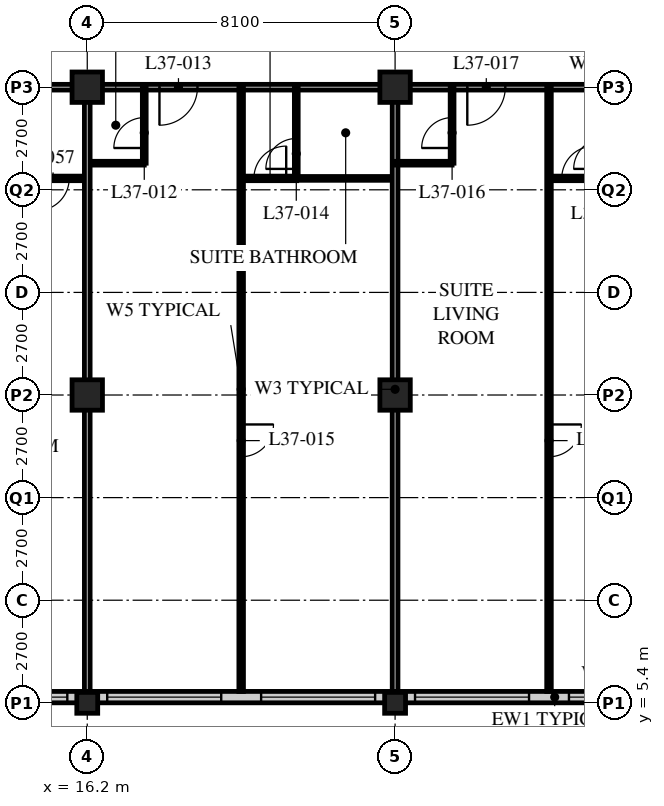
"""IFC4 building model, lengths in metres.
Left out: names, types, materials, properties, quantities, classifications, styles, units other than length and angle.
Written with IfcOpenShell. Run it as: python <this file> out.ifc"""

import sys

from ifc_helpers import new_model, si_unit, direction, frame, frame_2d, origin, origin_2d, place, context, subcontext, project, spatial, rectangle, hollow_rectangle, extrude, element, fill, save


model = new_model("IFC4")
c1 = context("Model", 3, precision=1e-05, world=origin(), true_north=direction((0.0, 1.0)))
c2 = subcontext(c1, "Body", "Model", "MODEL_VIEW")
j1 = project(units=[si_unit("LENGTHUNIT", "METRE"), si_unit("PLANEANGLEUNIT", "RADIAN")], contexts=[c1])
p1 = place(None, origin())
s1 = spatial("IfcSite", under=j1, at=p1, CompositionType="ELEMENT")
p2 = place(p1, origin())
s2 = spatial("IfcBuilding", under=s1, at=p2, CompositionType="ELEMENT")
p3 = place(p2, frame((0.0, 0.0, 144.2)))
s3 = spatial("IfcBuildingStorey", under=s2, at=p3, CompositionType="ELEMENT", Elevation=144.2)
p4 = place(p3, frame((16.2, 5.4, 0.0), z_axis=(0.0, 0.0, 1.0), x_axis=(1.0, 0.0, 0.0)))
e1 = element("IfcColumn", 1, at=p4, inside=s3, PredefinedType="COLUMN", context=c2, shape_type="SweptSolid", body=[
    extrude(hollow_rectangle(XDim=0.55, YDim=0.55, WallThickness=0.04, at=origin_2d()), origin(), (0.0, 0.0, 1.0), 3.4),
])
for number, where, z_axis, x_axis in (
    (2, (16.2, 13.5, 0.0), (0.0, 0.0, 1.0), (1.0, 0.0, 0.0)),
    (3, (16.2, 21.6, 0.0), (0.0, 0.0, 1.0), (1.0, 0.0, 0.0)),
):
    element("IfcColumn", number, at=place(p3, frame(where, z_axis=z_axis, x_axis=x_axis)), inside=s3, PredefinedType="COLUMN", context=c2, shape_type="SweptSolid", body=[
        extrude(hollow_rectangle(XDim=0.8, YDim=0.8, WallThickness=0.08, at=origin_2d()), origin(), (0.0, 0.0, 1.0), 3.4),
    ])
p5 = place(p3, frame((24.3, 5.4, 0.0), z_axis=(0.0, 0.0, 1.0), x_axis=(1.0, 0.0, 0.0)))
e4 = element("IfcColumn", 4, at=p5, inside=s3, PredefinedType="COLUMN", context=c2, shape_type="SweptSolid", body=[
    extrude(hollow_rectangle(XDim=0.55, YDim=0.55, WallThickness=0.04, at=origin_2d()), origin(), (0.0, 0.0, 1.0), 3.4),
])
for number, where, z_axis, x_axis in (
    (5, (24.3, 13.5, 0.0), (0.0, 0.0, 1.0), (1.0, 0.0, 0.0)),
    (6, (24.3, 21.6, 0.0), (0.0, 0.0, 1.0), (1.0, 0.0, 0.0)),
):
    element("IfcColumn", number, at=place(p3, frame(where, z_axis=z_axis, x_axis=x_axis)), inside=s3, PredefinedType="COLUMN", context=c2, shape_type="SweptSolid", body=[
        extrude(hollow_rectangle(XDim=0.8, YDim=0.8, WallThickness=0.08, at=origin_2d()), origin(), (0.0, 0.0, 1.0), 3.4),
    ])
p6 = place(p3, frame((8.4, 5.55, 0.0), z_axis=(0.0, 0.0, 1.0), x_axis=(1.0, 0.0, 0.0)))
e7 = element("IfcWall", 7, at=p6, inside=s3, PredefinedType="SOLIDWALL", context=c2, shape_type="SweptSolid", body=[
    extrude(rectangle(XDim=40.2, YDim=0.3, at=frame_2d((20.1, 0.0))), origin(), (0.0, 0.0, 1.0), 3.19),
])
p7 = place(p6, frame((0.225, 0.0, 0.9)))
e8 = element("IfcOpeningElement", 8, at=p7, cuts=e7, PredefinedType="OPENING", context=c2, shape_type="SweptSolid", body=[
    extrude(rectangle(XDim=3.0, YDim=1.4, at=frame_2d((1.5, 0.7))), frame((0.0, 0.16, 0.0), z_axis=(0.0, -1.0, 0.0), x_axis=(1.0, 0.0, 0.0)), (0.0, 0.0, 1.0), 0.32),
])
p8 = place(p6, frame((4.275, 0.0, 0.9)))
e9 = element("IfcOpeningElement", 9, at=p8, cuts=e7, PredefinedType="OPENING", context=c2, shape_type="SweptSolid", body=[
    extrude(rectangle(XDim=3.0, YDim=1.4, at=frame_2d((1.5, 0.7))), frame((0.0, 0.16, 0.0), z_axis=(0.0, -1.0, 0.0), x_axis=(1.0, 0.0, 0.0)), (0.0, 0.0, 1.0), 0.32),
])
p9 = place(p6, frame((8.325, 0.0, 0.9)))
e10 = element("IfcOpeningElement", 10, at=p9, cuts=e7, PredefinedType="OPENING", context=c2, shape_type="SweptSolid", body=[
    extrude(rectangle(XDim=3.0, YDim=1.4, at=frame_2d((1.5, 0.7))), frame((0.0, 0.16, 0.0), z_axis=(0.0, -1.0, 0.0), x_axis=(1.0, 0.0, 0.0)), (0.0, 0.0, 1.0), 0.32),
])
p10 = place(p6, frame((12.375, 0.0, 0.9)))
e11 = element("IfcOpeningElement", 11, at=p10, cuts=e7, PredefinedType="OPENING", context=c2, shape_type="SweptSolid", body=[
    extrude(rectangle(XDim=3.0, YDim=1.4, at=frame_2d((1.5, 0.7))), frame((0.0, 0.16, 0.0), z_axis=(0.0, -1.0, 0.0), x_axis=(1.0, 0.0, 0.0)), (0.0, 0.0, 1.0), 0.32),
])
p11 = place(p6, frame((16.425, 0.0, 0.9)))
e12 = element("IfcOpeningElement", 12, at=p11, cuts=e7, PredefinedType="OPENING", context=c2, shape_type="SweptSolid", body=[
    extrude(rectangle(XDim=3.0, YDim=1.4, at=frame_2d((1.5, 0.7))), frame((0.0, 0.16, 0.0), z_axis=(0.0, -1.0, 0.0), x_axis=(1.0, 0.0, 0.0)), (0.0, 0.0, 1.0), 0.32),
])
p12 = place(p6, frame((20.475, 0.0, 0.9)))
e13 = element("IfcOpeningElement", 13, at=p12, cuts=e7, PredefinedType="OPENING", context=c2, shape_type="SweptSolid", body=[
    extrude(rectangle(XDim=3.0, YDim=1.4, at=frame_2d((1.5, 0.7))), frame((0.0, 0.16, 0.0), z_axis=(0.0, -1.0, 0.0), x_axis=(1.0, 0.0, 0.0)), (0.0, 0.0, 1.0), 0.32),
])
p13 = place(p6, frame((24.525, 0.0, 0.9)))
e14 = element("IfcOpeningElement", 14, at=p13, cuts=e7, PredefinedType="OPENING", context=c2, shape_type="SweptSolid", body=[
    extrude(rectangle(XDim=3.0, YDim=1.4, at=frame_2d((1.5, 0.7))), frame((0.0, 0.16, 0.0), z_axis=(0.0, -1.0, 0.0), x_axis=(1.0, 0.0, 0.0)), (0.0, 0.0, 1.0), 0.32),
])
p14 = place(p6, frame((28.575, 0.0, 0.9)))
e15 = element("IfcOpeningElement", 15, at=p14, cuts=e7, PredefinedType="OPENING", context=c2, shape_type="SweptSolid", body=[
    extrude(rectangle(XDim=3.0, YDim=1.4, at=frame_2d((1.5, 0.7))), frame((0.0, 0.16, 0.0), z_axis=(0.0, -1.0, 0.0), x_axis=(1.0, 0.0, 0.0)), (0.0, 0.0, 1.0), 0.32),
])
p15 = place(p6, frame((32.625, 0.0, 0.9)))
e16 = element("IfcOpeningElement", 16, at=p15, cuts=e7, PredefinedType="OPENING", context=c2, shape_type="SweptSolid", body=[
    extrude(rectangle(XDim=3.0, YDim=1.4, at=frame_2d((1.5, 0.7))), frame((0.0, 0.16, 0.0), z_axis=(0.0, -1.0, 0.0), x_axis=(1.0, 0.0, 0.0)), (0.0, 0.0, 1.0), 0.32),
])
p16 = place(p6, frame((36.675, 0.0, 0.9)))
e17 = element("IfcOpeningElement", 17, at=p16, cuts=e7, PredefinedType="OPENING", context=c2, shape_type="SweptSolid", body=[
    extrude(rectangle(XDim=3.0, YDim=1.4, at=frame_2d((1.5, 0.7))), frame((0.0, 0.16, 0.0), z_axis=(0.0, -1.0, 0.0), x_axis=(1.0, 0.0, 0.0)), (0.0, 0.0, 1.0), 0.32),
])
p17 = place(p3, frame((12.15, 21.6, 0.0), z_axis=(0.0, 0.0, 1.0), x_axis=(1.0, 0.0, 0.0)))
e18 = element("IfcWall", 18, at=p17, inside=s3, PredefinedType="PARTITIONING", context=c2, shape_type="SweptSolid", body=[
    extrude(rectangle(XDim=36.45, YDim=0.15, at=frame_2d((18.225, 0.0))), origin(), (0.0, 0.0, 1.0), 2.42),
])
p18 = place(p17, frame((5.95, 0.0, 0.0)))
e19 = element("IfcOpeningElement", 19, at=p18, cuts=e18, PredefinedType="OPENING", context=c2, shape_type="SweptSolid", body=[
    extrude(rectangle(XDim=1.0, YDim=2.1, at=frame_2d((0.5, 1.05))), frame((0.0, 0.085, 0.0), z_axis=(0.0, -1.0, 0.0), x_axis=(1.0, 0.0, 0.0)), (0.0, 0.0, 1.0), 0.17),
])
p19 = place(p17, frame((14.05, 0.0, 0.0)))
e20 = element("IfcOpeningElement", 20, at=p19, cuts=e18, PredefinedType="OPENING", context=c2, shape_type="SweptSolid", body=[
    extrude(rectangle(XDim=1.0, YDim=2.1, at=frame_2d((0.5, 1.05))), frame((0.0, 0.085, 0.0), z_axis=(0.0, -1.0, 0.0), x_axis=(1.0, 0.0, 0.0)), (0.0, 0.0, 1.0), 0.17),
])
p20 = place(p17, frame((22.15, 0.0, 0.0)))
e21 = element("IfcOpeningElement", 21, at=p20, cuts=e18, PredefinedType="OPENING", context=c2, shape_type="SweptSolid", body=[
    extrude(rectangle(XDim=1.0, YDim=2.1, at=frame_2d((0.5, 1.05))), frame((0.0, 0.085, 0.0), z_axis=(0.0, -1.0, 0.0), x_axis=(1.0, 0.0, 0.0)), (0.0, 0.0, 1.0), 0.17),
])
p21 = place(p17, frame((30.8, 0.0, 0.0)))
e22 = element("IfcOpeningElement", 22, at=p21, cuts=e18, PredefinedType="OPENING", context=c2, shape_type="SweptSolid", body=[
    extrude(rectangle(XDim=1.0, YDim=2.1, at=frame_2d((0.5, 1.05))), frame((0.0, 0.085, 0.0), z_axis=(0.0, -1.0, 0.0), x_axis=(1.0, 0.0, 0.0)), (0.0, 0.0, 1.0), 0.17),
])
p22 = place(p17, frame((1.525, 0.0, 0.0)))
e23 = element("IfcOpeningElement", 23, at=p22, cuts=e18, PredefinedType="OPENING", context=c2, shape_type="SweptSolid", body=[
    extrude(rectangle(XDim=1.0, YDim=2.1, at=frame_2d((0.5, 1.05))), frame((0.0, 0.085, 0.0), z_axis=(0.0, -1.0, 0.0), x_axis=(1.0, 0.0, 0.0)), (0.0, 0.0, 1.0), 0.17),
])
p23 = place(p17, frame((33.925, 0.0, 0.0)))
e24 = element("IfcOpeningElement", 24, at=p23, cuts=e18, PredefinedType="OPENING", context=c2, shape_type="SweptSolid", body=[
    extrude(rectangle(XDim=1.0, YDim=2.1, at=frame_2d((0.5, 1.05))), frame((0.0, 0.085, 0.0), z_axis=(0.0, -1.0, 0.0), x_axis=(1.0, 0.0, 0.0)), (0.0, 0.0, 1.0), 0.17),
])
p24 = place(p3, frame((16.2, 19.6, 0.0), z_axis=(0.0, 0.0, 1.0), x_axis=(1.0, 0.0, 0.0)))
e25 = element("IfcWall", 25, at=p24, inside=s3, PredefinedType="PARTITIONING", context=c2, shape_type="SweptSolid", body=[
    extrude(rectangle(XDim=1.5, YDim=0.1, at=frame_2d((0.75, 0.0))), origin(), (0.0, 0.0, 1.0), 3.19),
])
p25 = place(p3, frame((17.7, 21.6, 0.0), z_axis=(0.0, 0.0, 1.0), x_axis=(0.0, -1.0, 0.0)))
e26 = element("IfcWall", 26, at=p25, inside=s3, PredefinedType="PARTITIONING", context=c2, shape_type="SweptSolid", body=[
    extrude(rectangle(XDim=2.0, YDim=0.1, at=frame_2d((1.0, 0.0))), origin(), (0.0, 0.0, 1.0), 3.19),
])
p26 = place(p25, frame((0.8, 0.0, 0.0)))
e27 = element("IfcOpeningElement", 27, at=p26, cuts=e26, PredefinedType="OPENING", context=c2, shape_type="SweptSolid", body=[
    extrude(rectangle(XDim=0.8, YDim=2.1, at=frame_2d((0.4, 1.05))), frame((0.0, 0.06, 0.0), z_axis=(0.0, -1.0, 0.0), x_axis=(1.0, 0.0, 0.0)), (0.0, 0.0, 1.0), 0.12),
])
p27 = place(p3, frame((21.7, 19.2, 0.0), z_axis=(0.0, 0.0, 1.0), x_axis=(1.0, 0.0, 0.0)))
e28 = element("IfcWall", 28, at=p27, inside=s3, PredefinedType="PARTITIONING", context=c2, shape_type="SweptSolid", body=[
    extrude(rectangle(XDim=2.6, YDim=0.1, at=frame_2d((1.3, 0.0))), origin(), (0.0, 0.0, 1.0), 3.19),
])
p28 = place(p3, frame((21.7, 21.6, 0.0), z_axis=(0.0, 0.0, 1.0), x_axis=(0.0, -1.0, 0.0)))
e29 = element("IfcWall", 29, at=p28, inside=s3, PredefinedType="PARTITIONING", context=c2, shape_type="SweptSolid", body=[
    extrude(rectangle(XDim=2.4, YDim=0.1, at=frame_2d((1.2, 0.0))), origin(), (0.0, 0.0, 1.0), 3.19),
])
p29 = place(p28, frame((1.35, 0.0, 0.0)))
e30 = element("IfcOpeningElement", 30, at=p29, cuts=e29, PredefinedType="OPENING", context=c2, shape_type="SweptSolid", body=[
    extrude(rectangle(XDim=0.8, YDim=2.1, at=frame_2d((0.4, 1.05))), frame((0.0, 0.06, 0.0), z_axis=(0.0, -1.0, 0.0), x_axis=(1.0, 0.0, 0.0)), (0.0, 0.0, 1.0), 0.12),
])
p30 = place(p3, frame((20.25, 21.6, 0.0), z_axis=(0.0, 0.0, 1.0), x_axis=(0.0, -1.0, 0.0)))
e31 = element("IfcWall", 31, at=p30, inside=s3, PredefinedType="PARTITIONING", context=c2, shape_type="SweptSolid", body=[
    extrude(rectangle(XDim=15.9, YDim=0.12, at=frame_2d((7.95, 0.0))), origin(), (0.0, 0.0, 1.0), 3.19),
])
p31 = place(p30, frame((8.875, 0.0, 0.0)))
e32 = element("IfcOpeningElement", 32, at=p31, cuts=e31, PredefinedType="OPENING", context=c2, shape_type="SweptSolid", body=[
    extrude(rectangle(XDim=0.85, YDim=2.1, at=frame_2d((0.425, 1.05))), frame((0.0, 0.07, 0.0), z_axis=(0.0, -1.0, 0.0), x_axis=(1.0, 0.0, 0.0)), (0.0, 0.0, 1.0), 0.14),
])
p32 = place(p3, frame((24.3, 21.6, 0.0), z_axis=(0.0, 0.0, 1.0), x_axis=(0.0, -1.0, 0.0)))
e33 = element("IfcWall", 33, at=p32, inside=s3, PredefinedType="PARTITIONING", context=c2, shape_type="SweptSolid", body=[
    extrude(rectangle(XDim=15.9, YDim=0.15, at=frame_2d((7.95, 0.0))), origin(), (0.0, 0.0, 1.0), 2.42),
])
p33 = place(p3, frame((24.3, 19.6, 0.0), z_axis=(0.0, 0.0, 1.0), x_axis=(1.0, 0.0, 0.0)))
e34 = element("IfcWall", 34, at=p33, inside=s3, PredefinedType="PARTITIONING", context=c2, shape_type="SweptSolid", body=[
    extrude(rectangle(XDim=1.5, YDim=0.1, at=frame_2d((0.75, 0.0))), origin(), (0.0, 0.0, 1.0), 3.19),
])
p34 = place(p3, frame((25.8, 21.6, 0.0), z_axis=(0.0, 0.0, 1.0), x_axis=(0.0, -1.0, 0.0)))
e35 = element("IfcWall", 35, at=p34, inside=s3, PredefinedType="PARTITIONING", context=c2, shape_type="SweptSolid", body=[
    extrude(rectangle(XDim=2.0, YDim=0.1, at=frame_2d((1.0, 0.0))), origin(), (0.0, 0.0, 1.0), 3.19),
])
p35 = place(p34, frame((0.8, 0.0, 0.0)))
e36 = element("IfcOpeningElement", 36, at=p35, cuts=e35, PredefinedType="OPENING", context=c2, shape_type="SweptSolid", body=[
    extrude(rectangle(XDim=0.8, YDim=2.1, at=frame_2d((0.4, 1.05))), frame((0.0, 0.06, 0.0), z_axis=(0.0, -1.0, 0.0), x_axis=(1.0, 0.0, 0.0)), (0.0, 0.0, 1.0), 0.12),
])
p36 = place(p3, frame((28.35, 21.6, 0.0), z_axis=(0.0, 0.0, 1.0), x_axis=(0.0, -1.0, 0.0)))
e37 = element("IfcWall", 37, at=p36, inside=s3, PredefinedType="PARTITIONING", context=c2, shape_type="SweptSolid", body=[
    extrude(rectangle(XDim=15.9, YDim=0.12, at=frame_2d((7.95, 0.0))), origin(), (0.0, 0.0, 1.0), 3.19),
])
p37 = place(p36, frame((8.875, 0.0, 0.0)))
e38 = element("IfcOpeningElement", 38, at=p37, cuts=e37, PredefinedType="OPENING", context=c2, shape_type="SweptSolid", body=[
    extrude(rectangle(XDim=0.85, YDim=2.1, at=frame_2d((0.425, 1.05))), frame((0.0, 0.07, 0.0), z_axis=(0.0, -1.0, 0.0), x_axis=(1.0, 0.0, 0.0)), (0.0, 0.0, 1.0), 0.14),
])
p38 = place(p3, frame((8.15, 19.2, 0.0), z_axis=(0.0, 0.0, 1.0), x_axis=(1.0, 0.0, 0.0)))
e39 = element("IfcWall", 39, at=p38, inside=s3, PredefinedType="PARTITIONING", context=c2, shape_type="SweptSolid", body=[
    extrude(rectangle(XDim=8.05, YDim=0.12, at=frame_2d((4.025, 0.0))), origin(), (0.0, 0.0, 1.0), 3.19),
])
p39 = place(p38, frame((6.725, 0.0, 0.0)))
e40 = element("IfcOpeningElement", 40, at=p39, cuts=e39, PredefinedType="OPENING", context=c2, shape_type="SweptSolid", body=[
    extrude(rectangle(XDim=0.85, YDim=2.1, at=frame_2d((0.425, 1.05))), frame((0.0, 0.07, 0.0), z_axis=(0.0, -1.0, 0.0), x_axis=(1.0, 0.0, 0.0)), (0.0, 0.0, 1.0), 0.14),
])
p40 = place(p38, frame((2.875, 0.0, 0.0)))
e41 = element("IfcOpeningElement", 41, at=p40, cuts=e39, PredefinedType="OPENING", context=c2, shape_type="SweptSolid", body=[
    extrude(rectangle(XDim=0.85, YDim=2.1, at=frame_2d((0.425, 1.05))), frame((0.0, 0.07, 0.0), z_axis=(0.0, -1.0, 0.0), x_axis=(1.0, 0.0, 0.0)), (0.0, 0.0, 1.0), 0.14),
])
p41 = place(p3, frame((16.2, 21.6, 0.0), z_axis=(0.0, 0.0, 1.0), x_axis=(0.0, -1.0, 0.0)))
e42 = element("IfcWall", 42, at=p41, inside=s3, PredefinedType="PARTITIONING", context=c2, shape_type="SweptSolid", body=[
    extrude(rectangle(XDim=15.9, YDim=0.15, at=frame_2d((7.95, 0.0))), origin(), (0.0, 0.0, 1.0), 2.42),
])
p42 = place(p3, frame((21.71, 19.2, 0.0), z_axis=(0.0, 0.0, 1.0), x_axis=(-1.0, 0.0, 0.0)))
e43 = element("IfcWall", 43, at=p42, inside=s3, PredefinedType="PARTITIONING", context=c2, shape_type="SweptSolid", body=[
    extrude(rectangle(XDim=1.46, YDim=0.12, at=frame_2d((0.73, 0.0))), origin(), (0.0, 0.0, 1.0), 3.19),
])
p43 = place(p42, frame((0.275, 0.0, 0.0)))
e44 = element("IfcOpeningElement", 44, at=p43, cuts=e43, PredefinedType="OPENING", context=c2, shape_type="SweptSolid", body=[
    extrude(rectangle(XDim=0.85, YDim=2.1, at=frame_2d((0.425, 1.05))), frame((0.0, 0.07, 0.0), z_axis=(0.0, -1.0, 0.0), x_axis=(1.0, 0.0, 0.0)), (0.0, 0.0, 1.0), 0.14),
])
p44 = place(p3, frame((29.81, 19.2, 0.0), z_axis=(0.0, 0.0, 1.0), x_axis=(-1.0, 0.0, 0.0)))
e45 = element("IfcWall", 45, at=p44, inside=s3, PredefinedType="PARTITIONING", context=c2, shape_type="SweptSolid", body=[
    extrude(rectangle(XDim=1.46, YDim=0.12, at=frame_2d((0.73, 0.0))), origin(), (0.0, 0.0, 1.0), 3.19),
])
p45 = place(p44, frame((0.275, 0.0, 0.0)))
e46 = element("IfcOpeningElement", 46, at=p45, cuts=e45, PredefinedType="OPENING", context=c2, shape_type="SweptSolid", body=[
    extrude(rectangle(XDim=0.85, YDim=2.1, at=frame_2d((0.425, 1.05))), frame((0.0, 0.07, 0.0), z_axis=(0.0, -1.0, 0.0), x_axis=(1.0, 0.0, 0.0)), (0.0, 0.0, 1.0), 0.14),
])
p46 = place(p8, origin())
e47 = element("IfcWindow", 47, at=p46, inside=s3, PartitioningType="SINGLE_PANEL", PredefinedType="WINDOW", context=c2, shape_type="SweptSolid", body=[
    extrude(rectangle(XDim=3.0, YDim=1.4, at=frame_2d((1.5, 0.7))), frame((0.0, 0.03, 0.0), z_axis=(0.0, -1.0, 0.0), x_axis=(1.0, 0.0, 0.0)), (0.0, 0.0, 1.0), 0.06),
])
fill(e9, e47)
p47 = place(p9, origin())
e48 = element("IfcWindow", 48, at=p47, inside=s3, PartitioningType="SINGLE_PANEL", PredefinedType="WINDOW", context=c2, shape_type="SweptSolid", body=[
    extrude(rectangle(XDim=3.0, YDim=1.4, at=frame_2d((1.5, 0.7))), frame((0.0, 0.03, 0.0), z_axis=(0.0, -1.0, 0.0), x_axis=(1.0, 0.0, 0.0)), (0.0, 0.0, 1.0), 0.06),
])
fill(e10, e48)
p48 = place(p10, origin())
e49 = element("IfcWindow", 49, at=p48, inside=s3, PartitioningType="SINGLE_PANEL", PredefinedType="WINDOW", context=c2, shape_type="SweptSolid", body=[
    extrude(rectangle(XDim=3.0, YDim=1.4, at=frame_2d((1.5, 0.7))), frame((0.0, 0.03, 0.0), z_axis=(0.0, -1.0, 0.0), x_axis=(1.0, 0.0, 0.0)), (0.0, 0.0, 1.0), 0.06),
])
fill(e11, e49)
p49 = place(p11, origin())
e50 = element("IfcWindow", 50, at=p49, inside=s3, PartitioningType="SINGLE_PANEL", PredefinedType="WINDOW", context=c2, shape_type="SweptSolid", body=[
    extrude(rectangle(XDim=3.0, YDim=1.4, at=frame_2d((1.5, 0.7))), frame((0.0, 0.03, 0.0), z_axis=(0.0, -1.0, 0.0), x_axis=(1.0, 0.0, 0.0)), (0.0, 0.0, 1.0), 0.06),
])
fill(e12, e50)
p50 = place(p12, origin())
e51 = element("IfcWindow", 51, at=p50, inside=s3, PartitioningType="SINGLE_PANEL", PredefinedType="WINDOW", context=c2, shape_type="SweptSolid", body=[
    extrude(rectangle(XDim=3.0, YDim=1.4, at=frame_2d((1.5, 0.7))), frame((0.0, 0.03, 0.0), z_axis=(0.0, -1.0, 0.0), x_axis=(1.0, 0.0, 0.0)), (0.0, 0.0, 1.0), 0.06),
])
fill(e13, e51)
p51 = place(p26, origin())
e52 = element("IfcDoor", 52, at=p51, inside=s3, OperationType="SINGLE_SWING_LEFT", PredefinedType="DOOR", context=c2, shape_type="SweptSolid", body=[
    extrude(rectangle(XDim=0.8, YDim=2.1, at=frame_2d((0.4, 1.05))), frame((0.0, 0.025, 0.0), z_axis=(0.0, -1.0, 0.0), x_axis=(1.0, 0.0, 0.0)), (0.0, 0.0, 1.0), 0.05),
])
fill(e27, e52)
p52 = place(p18, origin())
e53 = element("IfcDoor", 53, at=p52, inside=s3, OperationType="SINGLE_SWING_RIGHT", PredefinedType="DOOR", context=c2, shape_type="SweptSolid", body=[
    extrude(rectangle(XDim=1.0, YDim=2.1, at=frame_2d((0.5, 1.05))), frame((0.0, 0.025, 0.0), z_axis=(0.0, -1.0, 0.0), x_axis=(1.0, 0.0, 0.0)), (0.0, 0.0, 1.0), 0.05),
])
fill(e19, e53)
p53 = place(p29, origin())
e54 = element("IfcDoor", 54, at=p53, inside=s3, OperationType="SINGLE_SWING_LEFT", PredefinedType="DOOR", context=c2, shape_type="SweptSolid", body=[
    extrude(rectangle(XDim=0.8, YDim=2.1, at=frame_2d((0.4, 1.05))), frame((0.0, 0.025, 0.0), z_axis=(0.0, -1.0, 0.0), x_axis=(1.0, 0.0, 0.0)), (0.0, 0.0, 1.0), 0.05),
])
fill(e30, e54)
p54 = place(p31, origin())
e55 = element("IfcDoor", 55, at=p54, inside=s3, OperationType="SINGLE_SWING_LEFT", PredefinedType="DOOR", context=c2, shape_type="SweptSolid", body=[
    extrude(rectangle(XDim=0.85, YDim=2.1, at=frame_2d((0.425, 1.05))), frame((0.0, 0.025, 0.0), z_axis=(0.0, -1.0, 0.0), x_axis=(1.0, 0.0, 0.0)), (0.0, 0.0, 1.0), 0.05),
])
fill(e32, e55)
p55 = place(p35, origin())
e56 = element("IfcDoor", 56, at=p55, inside=s3, OperationType="SINGLE_SWING_LEFT", PredefinedType="DOOR", context=c2, shape_type="SweptSolid", body=[
    extrude(rectangle(XDim=0.8, YDim=2.1, at=frame_2d((0.4, 1.05))), frame((0.0, 0.025, 0.0), z_axis=(0.0, -1.0, 0.0), x_axis=(1.0, 0.0, 0.0)), (0.0, 0.0, 1.0), 0.05),
])
fill(e36, e56)
p56 = place(p19, origin())
e57 = element("IfcDoor", 57, at=p56, inside=s3, OperationType="SINGLE_SWING_RIGHT", PredefinedType="DOOR", context=c2, shape_type="SweptSolid", body=[
    extrude(rectangle(XDim=1.0, YDim=2.1, at=frame_2d((0.5, 1.05))), frame((0.0, 0.025, 0.0), z_axis=(0.0, -1.0, 0.0), x_axis=(1.0, 0.0, 0.0)), (0.0, 0.0, 1.0), 0.05),
])
fill(e20, e57)
p57 = place(p37, origin())
e58 = element("IfcDoor", 58, at=p57, inside=s3, OperationType="SINGLE_SWING_LEFT", PredefinedType="DOOR", context=c2, shape_type="SweptSolid", body=[
    extrude(rectangle(XDim=0.85, YDim=2.1, at=frame_2d((0.425, 1.05))), frame((0.0, 0.025, 0.0), z_axis=(0.0, -1.0, 0.0), x_axis=(1.0, 0.0, 0.0)), (0.0, 0.0, 1.0), 0.05),
])
fill(e38, e58)
p58 = place(p39, origin())
e59 = element("IfcDoor", 59, at=p58, inside=s3, OperationType="SINGLE_SWING_RIGHT", PredefinedType="DOOR", context=c2, shape_type="SweptSolid", body=[
    extrude(rectangle(XDim=0.85, YDim=2.1, at=frame_2d((0.425, 1.05))), frame((0.0, 0.025, 0.0), z_axis=(0.0, -1.0, 0.0), x_axis=(1.0, 0.0, 0.0)), (0.0, 0.0, 1.0), 0.05),
])
fill(e40, e59)
p59 = place(p43, origin())
e60 = element("IfcDoor", 60, at=p59, inside=s3, OperationType="SINGLE_SWING_RIGHT", PredefinedType="DOOR", context=c2, shape_type="SweptSolid", body=[
    extrude(rectangle(XDim=0.85, YDim=2.1, at=frame_2d((0.425, 1.05))), frame((0.0, 0.025, 0.0), z_axis=(0.0, -1.0, 0.0), x_axis=(1.0, 0.0, 0.0)), (0.0, 0.0, 1.0), 0.05),
])
fill(e44, e60)
p60 = place(p45, origin())
e61 = element("IfcDoor", 61, at=p60, inside=s3, OperationType="SINGLE_SWING_RIGHT", PredefinedType="DOOR", context=c2, shape_type="SweptSolid", body=[
    extrude(rectangle(XDim=0.85, YDim=2.1, at=frame_2d((0.425, 1.05))), frame((0.0, 0.025, 0.0), z_axis=(0.0, -1.0, 0.0), x_axis=(1.0, 0.0, 0.0)), (0.0, 0.0, 1.0), 0.05),
])
fill(e46, e61)
save(model, sys.argv[1])
